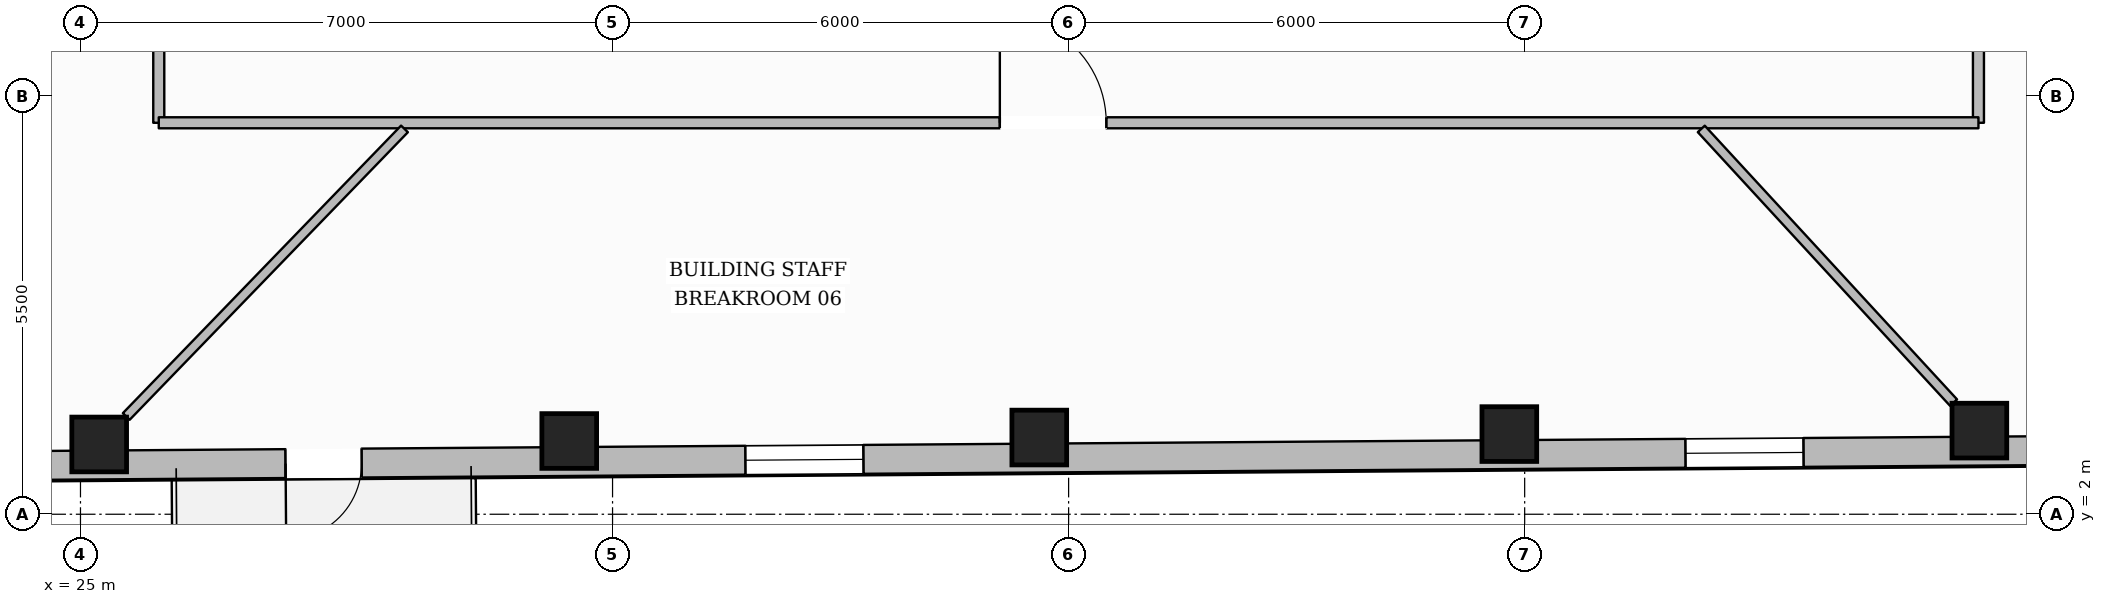
"""IFC4 building model, lengths in metres.
Left out: names, types, materials, properties, quantities, classifications, styles, units other than length and angle.
Written with IfcOpenShell. Run it as: python <this file> out.ifc"""

import sys

from ifc_helpers import new_model, si_unit, direction, frame, frame_2d, origin, origin_2d, place, context, subcontext, project, spatial, rectangle, hollow_rectangle, extrude, element, fill, save


model = new_model("IFC4")
c1 = context("Model", 3, precision=1e-05, world=origin(), true_north=direction((0.0, 1.0)))
c2 = subcontext(c1, "Body", "Model", "MODEL_VIEW")
j1 = project(units=[si_unit("LENGTHUNIT", "METRE"), si_unit("PLANEANGLEUNIT", "RADIAN")], contexts=[c1])
p1 = place(None, origin())
s1 = spatial("IfcSite", under=j1, at=p1, CompositionType="ELEMENT")
p2 = place(p1, origin())
s2 = spatial("IfcBuilding", under=s1, at=p2, CompositionType="ELEMENT")
p3 = place(p2, frame((0.0, 0.0, 143.25)))
s3 = spatial("IfcBuildingStorey", under=s2, at=p3, CompositionType="ELEMENT", Elevation=143.25)
for number, where, z_axis, x_axis in (
    (1, (25.246, 2.918, 0.0), (0.0, 0.0, 1.0), (1.0, 0.0, 0.0)),
    (2, (31.43, 2.964, 0.0), (0.0, 0.0, 1.0), (1.0, 0.0, 0.0)),
    (3, (37.614, 3.009, 0.0), (0.0, 0.0, 1.0), (1.0, 0.0, 0.0)),
    (4, (43.798, 3.055, 0.0), (0.0, 0.0, 1.0), (1.0, 0.0, 0.0)),
    (5, (49.982, 3.1, 0.0), (0.0, 0.0, 1.0), (1.0, 0.0, 0.0)),
):
    element("IfcColumn", number, at=place(p3, frame(where, z_axis=z_axis, x_axis=x_axis)), inside=s3, PredefinedType="COLUMN", context=c2, shape_type="SweptSolid", body=[
        extrude(hollow_rectangle(XDim=0.72, YDim=0.72, WallThickness=0.032, at=origin_2d()), origin(), (0.0, 0.0, 1.0), 3.6),
    ])
p4 = place(p3, frame((56.641, 2.879, 0.0), z_axis=(0.0, 0.0, 1.0), x_axis=(-0.99997292902, -0.007358072284, 0.0)))
e6 = element("IfcWall", 6, at=p4, inside=s3, PredefinedType="STANDARD", context=c2, shape_type="SweptSolid", body=[
    extrude(rectangle(XDim=38.057, YDim=0.38, at=frame_2d((19.029, 0.0))), origin(), (0.0, 0.0, 1.0), 3.059),
])
p5 = place(p4, frame((27.943, 0.0, 0.0)))
e7 = element("IfcOpeningElement", 7, at=p5, cuts=e6, PredefinedType="OPENING", context=c2, shape_type="SweptSolid", body=[
    extrude(rectangle(XDim=1.0, YDim=2.2, at=frame_2d((0.5, 1.1))), frame((0.0, 0.2, 0.0), z_axis=(0.0, -1.0, 0.0), x_axis=(1.0, 0.0, 0.0)), (0.0, 0.0, 1.0), 0.4),
])
p6 = place(p4, frame((33.711, 0.0, 0.65)))
e8 = element("IfcOpeningElement", 8, at=p6, cuts=e6, PredefinedType="OPENING", context=c2, shape_type="SweptSolid", body=[
    extrude(rectangle(XDim=1.55, YDim=1.75, at=frame_2d((0.775, 0.875))), frame((0.0, 0.2, 0.0), z_axis=(0.0, -1.0, 0.0), x_axis=(1.0, 0.0, 0.0)), (0.0, 0.0, 1.0), 0.4),
])
p7 = place(p4, frame((21.342, 0.0, 0.65)))
e9 = element("IfcOpeningElement", 9, at=p7, cuts=e6, PredefinedType="OPENING", context=c2, shape_type="SweptSolid", body=[
    extrude(rectangle(XDim=1.55, YDim=1.75, at=frame_2d((0.775, 0.875))), frame((0.0, 0.2, 0.0), z_axis=(0.0, -1.0, 0.0), x_axis=(1.0, 0.0, 0.0)), (0.0, 0.0, 1.0), 0.4),
])
p8 = place(p4, frame((8.974, 0.0, 0.65)))
e10 = element("IfcOpeningElement", 10, at=p8, cuts=e6, PredefinedType="OPENING", context=c2, shape_type="SweptSolid", body=[
    extrude(rectangle(XDim=1.55, YDim=1.75, at=frame_2d((0.775, 0.875))), frame((0.0, 0.2, 0.0), z_axis=(0.0, -1.0, 0.0), x_axis=(1.0, 0.0, 0.0)), (0.0, 0.0, 1.0), 0.4),
])
p9 = place(p4, frame((2.79, 0.0, 0.65)))
e11 = element("IfcOpeningElement", 11, at=p9, cuts=e6, PredefinedType="OPENING", context=c2, shape_type="SweptSolid", body=[
    extrude(rectangle(XDim=1.55, YDim=1.75, at=frame_2d((0.775, 0.875))), frame((0.0, 0.2, 0.0), z_axis=(0.0, -1.0, 0.0), x_axis=(1.0, 0.0, 0.0)), (0.0, 0.0, 1.0), 0.4),
])
p10 = place(p3, frame((49.97, 7.15, 0.0), z_axis=(0.0, 0.0, 1.0), x_axis=(0.0, 1.0, 0.0)))
e12 = element("IfcWall", 12, at=p10, inside=s3, PredefinedType="PARTITIONING", context=c2, shape_type="SweptSolid", body=[
    extrude(rectangle(XDim=17.9, YDim=0.145, at=frame_2d((8.95, 0.0))), origin(), (0.0, 0.0, 1.0), 3.288),
])
p11 = place(p10, frame((13.151, 0.0, 0.0)))
e13 = element("IfcOpeningElement", 13, at=p11, cuts=e12, PredefinedType="OPENING", context=c2, shape_type="SweptSolid", body=[
    extrude(rectangle(XDim=1.4, YDim=2.2, at=frame_2d((0.7, 1.1))), frame((0.0, 0.083, 0.0), z_axis=(0.0, -1.0, 0.0), x_axis=(1.0, 0.0, 0.0)), (0.0, 0.0, 1.0), 0.165),
])
p12 = place(p10, frame((4.372, 0.0, 0.0)))
e14 = element("IfcOpeningElement", 14, at=p12, cuts=e12, PredefinedType="OPENING", context=c2, shape_type="SweptSolid", body=[
    extrude(rectangle(XDim=1.4, YDim=2.2, at=frame_2d((0.7, 1.1))), frame((0.0, 0.083, 0.0), z_axis=(0.0, -1.0, 0.0), x_axis=(1.0, 0.0, 0.0)), (0.0, 0.0, 1.0), 0.165),
])
p13 = place(p3, frame((26.03, 25.05, 0.0), z_axis=(0.0, 0.0, 1.0), x_axis=(0.0, -1.0, 0.0)))
e15 = element("IfcWall", 15, at=p13, inside=s3, PredefinedType="PARTITIONING", context=c2, shape_type="SweptSolid", body=[
    extrude(rectangle(XDim=17.9, YDim=0.145, at=frame_2d((8.95, 0.0))), origin(), (0.0, 0.0, 1.0), 3.288),
])
p14 = place(p13, frame((3.663, 0.0, 0.0)))
e16 = element("IfcOpeningElement", 16, at=p14, cuts=e15, PredefinedType="OPENING", context=c2, shape_type="SweptSolid", body=[
    extrude(rectangle(XDim=0.98, YDim=2.15, at=frame_2d((0.49, 1.075))), frame((0.0, 0.083, 0.0), z_axis=(0.0, -1.0, 0.0), x_axis=(1.0, 0.0, 0.0)), (0.0, 0.0, 1.0), 0.165),
])
p15 = place(p13, frame((12.232, 0.0, 0.0)))
e17 = element("IfcOpeningElement", 17, at=p15, cuts=e15, PredefinedType="OPENING", context=c2, shape_type="SweptSolid", body=[
    extrude(rectangle(XDim=1.4, YDim=2.2, at=frame_2d((0.7, 1.1))), frame((0.0, 0.083, 0.0), z_axis=(0.0, -1.0, 0.0), x_axis=(1.0, 0.0, 0.0)), (0.0, 0.0, 1.0), 0.165),
])
p16 = place(p3, frame((26.03, 7.15, 0.0), z_axis=(0.0, 0.0, 1.0), x_axis=(1.0, 0.0, 0.0)))
e18 = element("IfcWall", 18, at=p16, inside=s3, PredefinedType="PARTITIONING", context=c2, shape_type="SweptSolid", body=[
    extrude(rectangle(XDim=23.94, YDim=0.145, at=frame_2d((11.97, 0.0))), origin(), (0.0, 0.0, 1.0), 3.6),
])
p17 = place(p16, frame((11.065, 0.0, 0.0)))
e19 = element("IfcOpeningElement", 19, at=p17, cuts=e18, PredefinedType="OPENING", context=c2, shape_type="SweptSolid", body=[
    extrude(rectangle(XDim=1.4, YDim=2.2, at=frame_2d((0.7, 1.1))), frame((0.0, 0.083, 0.0), z_axis=(0.0, -1.0, 0.0), x_axis=(1.0, 0.0, 0.0)), (0.0, 0.0, 1.0), 0.165),
])
p18 = place(p3, frame((29.263, 7.07, 0.0), z_axis=(0.0, 0.0, 1.0), x_axis=(-0.695300134942, -0.718719501857, 0.0)))
e20 = element("IfcWall", 20, at=p18, inside=s3, PredefinedType="PARTITIONING", context=c2, shape_type="SweptSolid", body=[
    extrude(rectangle(XDim=5.264, YDim=0.125, at=frame_2d((2.632, 0.0))), origin(), (0.0, 0.0, 1.0), 3.6),
])
p19 = place(p3, frame((46.323, 7.07, 0.0), z_axis=(0.0, 0.0, 1.0), x_axis=(0.677760289315, -0.735282932094, 0.0)))
e21 = element("IfcWall", 21, at=p19, inside=s3, PredefinedType="PARTITIONING", context=c2, shape_type="SweptSolid", body=[
    extrude(rectangle(XDim=4.898, YDim=0.125, at=frame_2d((2.449, 0.0))), origin(), (0.0, 0.0, 1.0), 3.6),
])
p20 = place(p5, origin())
e22 = element("IfcDoor", 22, at=p20, inside=s3, OperationType="SINGLE_SWING_RIGHT", PredefinedType="DOOR", context=c2, shape_type="SweptSolid", body=[
    extrude(rectangle(XDim=1.0, YDim=2.2, at=frame_2d((0.5, 1.1))), frame((0.0, 0.025, 0.0), z_axis=(0.0, -1.0, 0.0), x_axis=(1.0, 0.0, 0.0)), (0.0, 0.0, 1.0), 0.05),
])
fill(e7, e22)
p21 = place(p7, origin())
e23 = element("IfcWindow", 23, at=p21, inside=s3, PartitioningType="SINGLE_PANEL", PredefinedType="WINDOW", context=c2, shape_type="SweptSolid", body=[
    extrude(rectangle(XDim=1.55, YDim=1.75, at=frame_2d((0.775, 0.875))), frame((0.0, 0.03, 0.0), z_axis=(0.0, -1.0, 0.0), x_axis=(1.0, 0.0, 0.0)), (0.0, 0.0, 1.0), 0.06),
])
fill(e9, e23)
p22 = place(p8, origin())
e24 = element("IfcWindow", 24, at=p22, inside=s3, PartitioningType="SINGLE_PANEL", PredefinedType="WINDOW", context=c2, shape_type="SweptSolid", body=[
    extrude(rectangle(XDim=1.55, YDim=1.75, at=frame_2d((0.775, 0.875))), frame((0.0, 0.03, 0.0), z_axis=(0.0, -1.0, 0.0), x_axis=(1.0, 0.0, 0.0)), (0.0, 0.0, 1.0), 0.06),
])
fill(e10, e24)
p23 = place(p17, origin())
e25 = element("IfcDoor", 25, at=p23, inside=s3, OperationType="SINGLE_SWING_LEFT", PredefinedType="DOOR", context=c2, shape_type="SweptSolid", body=[
    extrude(rectangle(XDim=1.4, YDim=2.2, at=frame_2d((0.7, 1.1))), frame((0.0, 0.025, 0.0), z_axis=(0.0, -1.0, 0.0), x_axis=(1.0, 0.0, 0.0)), (0.0, 0.0, 1.0), 0.05),
])
fill(e19, e25)
save(model, sys.argv[1])
